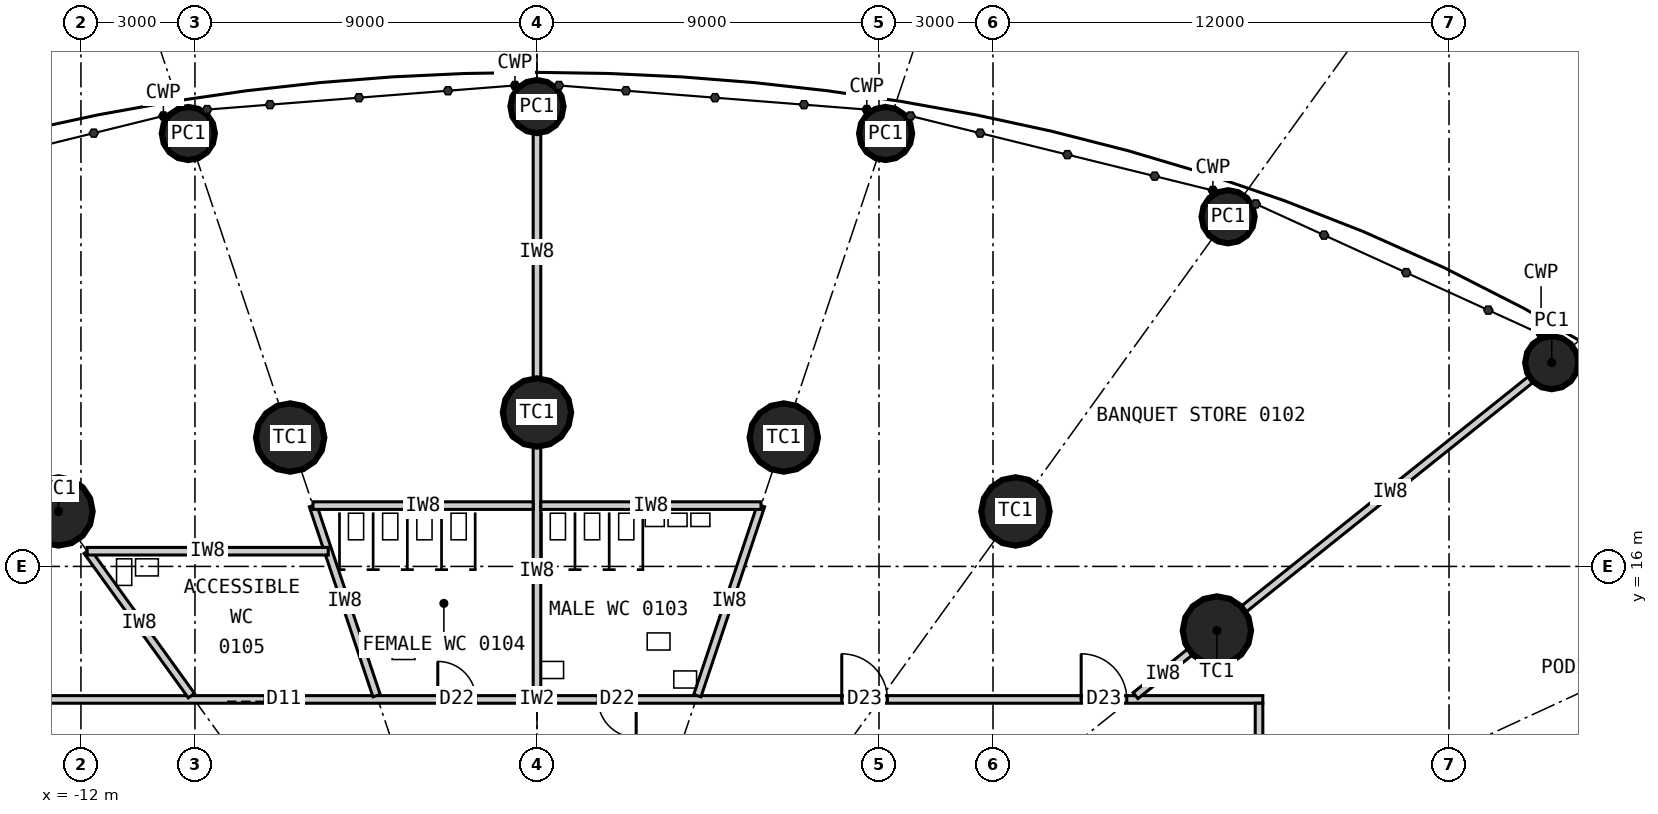
"""IFC4 building model, lengths in metres.
Left out: names, types, materials, properties, quantities, classifications, styles, units other than length and angle.
Written with IfcOpenShell. Run it as: python <this file> out.ifc"""

import sys

from ifc_helpers import new_model, si_unit, direction, frame, frame_2d, origin, origin_2d, place, context, subcontext, project, spatial, rectangle, circle, extrude, element, fill, save


model = new_model("IFC4")
c1 = context("Model", 3, precision=1e-05, world=origin(), true_north=direction((0.0, 1.0)))
c2 = subcontext(c1, "Body", "Model", "MODEL_VIEW")
j1 = project(units=[si_unit("LENGTHUNIT", "METRE"), si_unit("PLANEANGLEUNIT", "RADIAN")], contexts=[c1])
p1 = place(None, origin())
s1 = spatial("IfcSite", under=j1, at=p1, CompositionType="ELEMENT")
p2 = place(p1, origin())
s2 = spatial("IfcBuilding", under=s1, at=p2, CompositionType="ELEMENT")
p3 = place(p2, frame((0.0, 0.0, 7.2)))
s3 = spatial("IfcBuildingStorey", under=s2, at=p3, CompositionType="ELEMENT", Elevation=7.2)
for number, where, z_axis, x_axis in (
    (1, (17.892, 14.313, 0.0), (0.0, 0.0, 1.0), (1.0, 0.0, 0.0)),
    (2, (12.591, 17.447, 0.0), (0.0, 0.0, 1.0), (1.0, 0.0, 0.0)),
    (3, (6.495, 19.391, 0.0), (0.0, 0.0, 1.0), (1.0, 0.0, 0.0)),
    (4, (0.0, 20.05, 0.0), (0.0, 0.0, 1.0), (1.0, 0.0, 0.0)),
    (5, (-6.495, 19.391, 0.0), (0.0, 0.0, 1.0), (1.0, 0.0, 0.0)),
    (6, (-12.591, 17.447, 0.0), (0.0, 0.0, 1.0), (1.0, 0.0, 0.0)),
):
    element("IfcColumn", number, at=place(p3, frame(where, z_axis=z_axis, x_axis=x_axis)), inside=s3, PredefinedType="COLUMN", context=c2, shape_type="SweptSolid", body=[
        extrude(circle(Radius=0.9, at=origin_2d()), origin(), (0.0, 0.0, 1.0), 6.6),
    ])
for number, where, z_axis, x_axis in (
    (7, (26.702, 21.362, 0.0), (0.0, 0.0, 1.0), (1.0, 0.0, 0.0)),
    (8, (18.186, 25.199, 0.0), (0.0, 0.0, 1.0), (1.0, 0.0, 0.0)),
    (9, (9.174, 27.391, 0.0), (0.0, 0.0, 1.0), (1.0, 0.0, 0.0)),
    (10, (0.0, 28.1, 0.0), (0.0, 0.0, 1.0), (1.0, 0.0, 0.0)),
    (11, (-9.174, 27.391, 0.0), (0.0, 0.0, 1.0), (1.0, 0.0, 0.0)),
):
    element("IfcColumn", number, at=place(p3, frame(where, z_axis=z_axis, x_axis=x_axis)), inside=s3, PredefinedType="COLUMN", context=c2, shape_type="SweptSolid", body=[
        extrude(circle(Radius=0.7, at=origin_2d()), origin(), (0.0, 0.0, 1.0), 6.6),
    ])
p4 = place(p3, frame((-19.1, 12.5, 0.0), z_axis=(0.0, 0.0, 1.0), x_axis=(1.0, 0.0, 0.0)))
e12 = element("IfcWall", 12, at=p4, inside=s3, PredefinedType="PARTITIONING", context=c2, shape_type="SweptSolid", body=[
    extrude(rectangle(XDim=38.2, YDim=0.2, at=frame_2d((19.1, 0.0))), origin(), (0.0, 0.0, 1.0), 6.35),
])
p5 = place(p4, frame((27.12, 0.0, 0.0)))
e13 = element("IfcOpeningElement", 13, at=p5, cuts=e12, PredefinedType="OPENING", context=c2, shape_type="SweptSolid", body=[
    extrude(rectangle(XDim=1.2, YDim=2.2, at=frame_2d((0.6, 1.1))), frame((0.0, 0.11, 0.0), z_axis=(0.0, -1.0, 0.0), x_axis=(1.0, 0.0, 0.0)), (0.0, 0.0, 1.0), 0.22),
])
p6 = place(p4, frame((20.71, 0.0, 0.0)))
e14 = element("IfcOpeningElement", 14, at=p6, cuts=e12, PredefinedType="OPENING", context=c2, shape_type="SweptSolid", body=[
    extrude(rectangle(XDim=1.0, YDim=2.1, at=frame_2d((0.5, 1.05))), frame((0.0, 0.11, 0.0), z_axis=(0.0, -1.0, 0.0), x_axis=(1.0, 0.0, 0.0)), (0.0, 0.0, 1.0), 0.22),
])
p7 = place(p4, frame((16.49, 0.0, 0.0)))
e15 = element("IfcOpeningElement", 15, at=p7, cuts=e12, PredefinedType="OPENING", context=c2, shape_type="SweptSolid", body=[
    extrude(rectangle(XDim=1.0, YDim=2.1, at=frame_2d((0.5, 1.05))), frame((0.0, 0.11, 0.0), z_axis=(0.0, -1.0, 0.0), x_axis=(1.0, 0.0, 0.0)), (0.0, 0.0, 1.0), 0.22),
])
p8 = place(p4, frame((11.943, 0.0, 0.0)))
e16 = element("IfcOpeningElement", 16, at=p8, cuts=e12, PredefinedType="OPENING", context=c2, shape_type="SweptSolid", body=[
    extrude(rectangle(XDim=1.0, YDim=2.2, at=frame_2d((0.5, 1.1))), frame((0.0, 0.11, 0.0), z_axis=(0.0, -1.0, 0.0), x_axis=(1.0, 0.0, 0.0)), (0.0, 0.0, 1.0), 0.22),
])
p9 = place(p4, frame((33.42, 0.0, 0.0)))
e17 = element("IfcOpeningElement", 17, at=p9, cuts=e12, PredefinedType="OPENING", context=c2, shape_type="SweptSolid", body=[
    extrude(rectangle(XDim=1.2, YDim=2.2, at=frame_2d((0.6, 1.1))), frame((0.0, 0.11, 0.0), z_axis=(0.0, -1.0, 0.0), x_axis=(1.0, 0.0, 0.0)), (0.0, 0.0, 1.0), 0.22),
])
p10 = place(p3, frame((19.0, -12.4, 0.0), z_axis=(0.0, 0.0, 1.0), x_axis=(0.0, 1.0, 0.0)))
e18 = element("IfcWall", 18, at=p10, inside=s3, PredefinedType="PARTITIONING", context=c2, shape_type="SweptSolid", body=[
    extrude(rectangle(XDim=24.8, YDim=0.2, at=frame_2d((12.4, 0.0))), origin(), (0.0, 0.0, 1.0), 6.35),
])
p11 = place(p10, frame((15.753, 0.0, 0.0)))
e19 = element("IfcOpeningElement", 19, at=p11, cuts=e18, PredefinedType="OPENING", context=c2, shape_type="SweptSolid", body=[
    extrude(rectangle(XDim=1.8, YDim=2.4, at=frame_2d((0.9, 1.2))), frame((0.0, 0.11, 0.0), z_axis=(0.0, -1.0, 0.0), x_axis=(1.0, 0.0, 0.0)), (0.0, 0.0, 1.0), 0.22),
])
p12 = place(p3, frame((15.75, 12.6, 0.0), z_axis=(0.0, 0.0, 1.0), x_axis=(0.780881734892, 0.6246788904, 0.0)))
e20 = element("IfcWall", 20, at=p12, inside=s3, PredefinedType="PARTITIONING", context=c2, shape_type="SweptSolid", body=[
    extrude(rectangle(XDim=1.843, YDim=0.2, at=frame_2d((0.921, 0.0))), origin(), (0.0, 0.0, 1.0), 5.5),
])
p13 = place(p3, frame((18.594, 14.875, 0.0), z_axis=(0.0, 0.0, 1.0), x_axis=(0.780868809443, 0.624695047554, 0.0)))
e21 = element("IfcWall", 21, at=p13, inside=s3, PredefinedType="PARTITIONING", context=c2, shape_type="SweptSolid", body=[
    extrude(rectangle(XDim=9.883, YDim=0.2, at=frame_2d((4.941, 0.0))), origin(), (0.0, 0.0, 1.0), 5.45),
])
p14 = place(p3, frame((4.22, 12.6, 0.0), z_axis=(0.0, 0.0, 1.0), x_axis=(0.317574790206, 0.948233226915, 0.0)))
e22 = element("IfcWall", 22, at=p14, inside=s3, PredefinedType="PARTITIONING", context=c2, shape_type="SweptSolid", body=[
    extrude(rectangle(XDim=5.273, YDim=0.2, at=frame_2d((2.636, 0.0))), origin(), (0.0, 0.0, 1.0), 5.5),
])
p15 = place(p3, frame((0.0, 12.6, 0.0), z_axis=(0.0, 0.0, 1.0), x_axis=(0.0, 1.0, 0.0)))
e23 = element("IfcWall", 23, at=p15, inside=s3, PredefinedType="PARTITIONING", context=c2, shape_type="SweptSolid", body=[
    extrude(rectangle(XDim=6.55, YDim=0.2, at=frame_2d((3.275, 0.0))), origin(), (0.0, 0.0, 1.0), 5.5),
])
p16 = place(p3, frame((0.0, 20.95, 0.0), z_axis=(0.0, 0.0, 1.0), x_axis=(0.0, 1.0, 0.0)))
e24 = element("IfcWall", 24, at=p16, inside=s3, PredefinedType="PARTITIONING", context=c2, shape_type="SweptSolid", body=[
    extrude(rectangle(XDim=6.65, YDim=0.2, at=frame_2d((3.325, 0.0))), origin(), (0.0, 0.0, 1.0), 5.45),
])
p17 = place(p3, frame((-4.22, 12.6, 0.0), z_axis=(0.0, 0.0, 1.0), x_axis=(-0.317574790206, 0.948233226915, 0.0)))
e25 = element("IfcWall", 25, at=p17, inside=s3, PredefinedType="PARTITIONING", context=c2, shape_type="SweptSolid", body=[
    extrude(rectangle(XDim=5.273, YDim=0.2, at=frame_2d((2.636, 0.0))), origin(), (0.0, 0.0, 1.0), 5.5),
])
p18 = place(p3, frame((-9.093, 12.6, 0.0), z_axis=(0.0, 0.0, 1.0), x_axis=(-0.585228020299, 0.810868771292, 0.0)))
e26 = element("IfcWall", 26, at=p18, inside=s3, PredefinedType="PARTITIONING", context=c2, shape_type="SweptSolid", body=[
    extrude(rectangle(XDim=4.686, YDim=0.2, at=frame_2d((2.343, 0.0))), origin(), (0.0, 0.0, 1.0), 5.5),
])
for number, where, z_axis, x_axis in (
    (27, (5.895, 17.6, 0.0), (0.0, 0.0, 1.0), (-1.0, 0.0, 0.0)),
    (28, (-0.1, 17.6, 0.0), (0.0, 0.0, 1.0), (-1.0, 0.0, 0.0)),
):
    element("IfcWall", number, at=place(p3, frame(where, z_axis=z_axis, x_axis=x_axis)), inside=s3, PredefinedType="PARTITIONING", context=c2, shape_type="SweptSolid", body=[
        extrude(rectangle(XDim=5.795, YDim=0.2, at=frame_2d((2.897, 0.0))), origin(), (0.0, 0.0, 1.0), 6.35),
    ])
p19 = place(p3, frame((-5.493, 16.4, 0.0), z_axis=(0.0, 0.0, 1.0), x_axis=(-1.0, 0.0, 0.0)))
e29 = element("IfcWall", 29, at=p19, inside=s3, PredefinedType="PARTITIONING", context=c2, shape_type="SweptSolid", body=[
    extrude(rectangle(XDim=6.343, YDim=0.2, at=frame_2d((3.171, 0.0))), origin(), (0.0, 0.0, 1.0), 5.7),
])
p20 = place(p5, origin())
e30 = element("IfcDoor", 30, at=p20, inside=s3, OperationType="SINGLE_SWING_LEFT", PredefinedType="DOOR", context=c2, shape_type="SweptSolid", body=[
    extrude(rectangle(XDim=1.2, YDim=2.2, at=frame_2d((0.6, 1.1))), frame((0.0, 0.025, 0.0), z_axis=(0.0, -1.0, 0.0), x_axis=(1.0, 0.0, 0.0)), (0.0, 0.0, 1.0), 0.05),
])
fill(e13, e30)
p21 = place(p6, origin())
e31 = element("IfcDoor", 31, at=p21, inside=s3, OperationType="SINGLE_SWING_RIGHT", PredefinedType="DOOR", context=c2, shape_type="SweptSolid", body=[
    extrude(rectangle(XDim=1.0, YDim=2.1, at=frame_2d((0.5, 1.05))), frame((0.0, 0.025, 0.0), z_axis=(0.0, -1.0, 0.0), x_axis=(1.0, 0.0, 0.0)), (0.0, 0.0, 1.0), 0.05),
])
fill(e14, e31)
p22 = place(p7, origin())
e32 = element("IfcDoor", 32, at=p22, inside=s3, OperationType="SINGLE_SWING_LEFT", PredefinedType="DOOR", context=c2, shape_type="SweptSolid", body=[
    extrude(rectangle(XDim=1.0, YDim=2.1, at=frame_2d((0.5, 1.05))), frame((0.0, 0.025, 0.0), z_axis=(0.0, -1.0, 0.0), x_axis=(1.0, 0.0, 0.0)), (0.0, 0.0, 1.0), 0.05),
])
fill(e15, e32)
p23 = place(p8, origin())
e33 = element("IfcDoor", 33, at=p23, inside=s3, OperationType="SLIDING_TO_LEFT", PredefinedType="DOOR", context=c2, shape_type="SweptSolid", body=[
    extrude(rectangle(XDim=1.0, YDim=2.2, at=frame_2d((0.5, 1.1))), frame((0.0, 0.025, 0.0), z_axis=(0.0, -1.0, 0.0), x_axis=(1.0, 0.0, 0.0)), (0.0, 0.0, 1.0), 0.05),
])
fill(e16, e33)
p24 = place(p9, origin())
e34 = element("IfcDoor", 34, at=p24, inside=s3, OperationType="SINGLE_SWING_LEFT", PredefinedType="DOOR", context=c2, shape_type="SweptSolid", body=[
    extrude(rectangle(XDim=1.2, YDim=2.2, at=frame_2d((0.6, 1.1))), frame((0.0, 0.025, 0.0), z_axis=(0.0, -1.0, 0.0), x_axis=(1.0, 0.0, 0.0)), (0.0, 0.0, 1.0), 0.05),
])
fill(e17, e34)
save(model, sys.argv[1])
